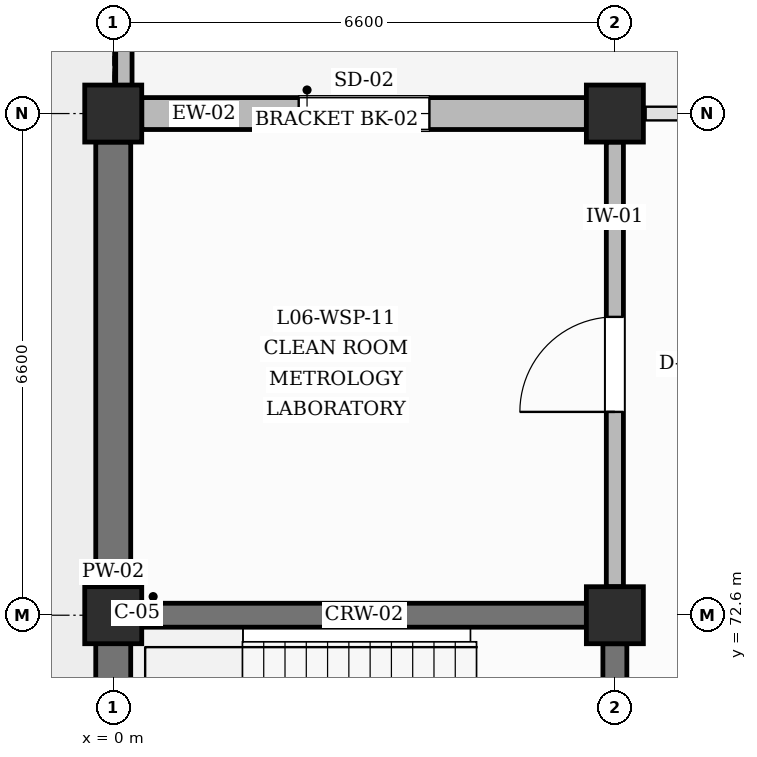
"""IFC4 building model, lengths in metres.
Left out: names, types, materials, properties, quantities, classifications, styles, units other than length and angle.
Written with IfcOpenShell. Run it as: python <this file> out.ifc"""

import sys

from ifc_helpers import new_model, si_unit, direction, frame, frame_2d, origin, origin_2d, place, context, subcontext, project, spatial, rectangle, extrude, element, fill, save


model = new_model("IFC4")
c1 = context("Model", 3, precision=1e-05, world=origin(), true_north=direction((0.0, 1.0)))
c2 = subcontext(c1, "Body", "Model", "MODEL_VIEW")
j1 = project(units=[si_unit("LENGTHUNIT", "METRE"), si_unit("PLANEANGLEUNIT", "RADIAN")], contexts=[c1])
p1 = place(None, origin())
s1 = spatial("IfcSite", under=j1, at=p1, CompositionType="ELEMENT")
p2 = place(p1, origin())
s2 = spatial("IfcBuilding", under=s1, at=p2, CompositionType="ELEMENT")
p3 = place(p2, frame((0.0, 0.0, 27.0)))
s3 = spatial("IfcBuildingStorey", under=s2, at=p3, CompositionType="ELEMENT", Elevation=27.0)
for number, where, z_axis, x_axis in (
    (1, (0.0, 72.6, 0.0), (0.0, 0.0, 1.0), (1.0, 0.0, 0.0)),
    (2, (0.0, 79.2, 0.0), (0.0, 0.0, 1.0), (1.0, 0.0, 0.0)),
    (3, (6.6, 72.6, 0.0), (0.0, 0.0, 1.0), (1.0, 0.0, 0.0)),
    (4, (6.6, 79.2, 0.0), (0.0, 0.0, 1.0), (1.0, 0.0, 0.0)),
):
    element("IfcColumn", number, at=place(p3, frame(where, z_axis=z_axis, x_axis=x_axis)), inside=s3, PredefinedType="COLUMN", context=c2, shape_type="SweptSolid", body=[
        extrude(rectangle(XDim=0.75, YDim=0.75, at=origin_2d()), origin(), (0.0, 0.0, 1.0), 4.2),
    ])
p4 = place(p3, frame((0.0, 66.375, 0.0), z_axis=(0.0, 0.0, 1.0), x_axis=(0.0, 1.0, 0.0)))
e5 = element("IfcWall", 5, at=p4, inside=s3, PredefinedType="SOLIDWALL", context=c2, shape_type="SweptSolid", body=[
    extrude(rectangle(XDim=5.85, YDim=0.46, at=frame_2d((2.925, 0.0))), origin(), (0.0, 0.0, 1.0), 3.27),
])
p5 = place(p3, frame((0.375, 79.2, 0.0), z_axis=(0.0, 0.0, 1.0), x_axis=(1.0, 0.0, 0.0)))
e6 = element("IfcWall", 6, at=p5, inside=s3, PredefinedType="SOLIDWALL", context=c2, shape_type="SweptSolid", body=[
    extrude(rectangle(XDim=5.85, YDim=0.42, at=frame_2d((2.925, 0.0))), origin(), (0.0, 0.0, 1.0), 3.27),
])
p6 = place(p5, frame((2.065, 0.0, 0.95)))
e7 = element("IfcOpeningElement", 7, at=p6, cuts=e6, PredefinedType="OPENING", context=c2, shape_type="SweptSolid", body=[
    extrude(rectangle(XDim=1.72, YDim=1.74, at=frame_2d((0.86, 0.87))), frame((0.0, 0.22, 0.0), z_axis=(0.0, -1.0, 0.0), x_axis=(1.0, 0.0, 0.0)), (0.0, 0.0, 1.0), 0.44),
])
p7 = place(p3, frame((0.0, 72.975, 0.0), z_axis=(0.0, 0.0, 1.0), x_axis=(0.0, 1.0, 0.0)))
e8 = element("IfcWall", 8, at=p7, inside=s3, PredefinedType="SOLIDWALL", context=c2, shape_type="SweptSolid", body=[
    extrude(rectangle(XDim=5.85, YDim=0.46, at=frame_2d((2.925, 0.0))), origin(), (0.0, 0.0, 1.0), 3.27),
])
p8 = place(p3, frame((0.14, 79.5, 0.0), z_axis=(0.0, 0.0, 1.0), x_axis=(0.0, 1.0, 0.0)))
e9 = element("IfcWall", 9, at=p8, inside=s3, PredefinedType="PARAPET", context=c2, shape_type="SweptSolid", body=[
    extrude(rectangle(XDim=6.0, YDim=0.215, at=frame_2d((3.0, 0.0))), origin(), (0.0, 0.0, 1.0), 1.15),
])
p9 = place(p3, frame((0.375, 72.6, 0.0), z_axis=(0.0, 0.0, 1.0), x_axis=(1.0, 0.0, 0.0)))
e10 = element("IfcWall", 10, at=p9, inside=s3, PredefinedType="SHEAR", context=c2, shape_type="SweptSolid", body=[
    extrude(rectangle(XDim=5.85, YDim=0.315, at=frame_2d((2.925, 0.0))), origin(), (0.0, 0.0, 1.0), 3.17),
])
p10 = place(p3, frame((6.6, 66.375, 0.0), z_axis=(0.0, 0.0, 1.0), x_axis=(0.0, 1.0, 0.0)))
e11 = element("IfcWall", 11, at=p10, inside=s3, PredefinedType="SHEAR", context=c2, shape_type="SweptSolid", body=[
    extrude(rectangle(XDim=5.85, YDim=0.315, at=frame_2d((2.925, 0.0))), origin(), (0.0, 0.0, 1.0), 3.17),
])
p11 = place(p10, frame((2.35, 0.0, 0.0)))
e12 = element("IfcOpeningElement", 12, at=p11, cuts=e11, PredefinedType="OPENING", context=c2, shape_type="SweptSolid", body=[
    extrude(rectangle(XDim=1.15, YDim=2.2, at=frame_2d((0.575, 1.1))), frame((0.0, 0.167, 0.0), z_axis=(0.0, -1.0, 0.0), x_axis=(1.0, 0.0, 0.0)), (0.0, 0.0, 1.0), 0.335),
])
p12 = place(p3, frame((6.6, 72.975, 0.0), z_axis=(0.0, 0.0, 1.0), x_axis=(0.0, 1.0, 0.0)))
e13 = element("IfcWall", 13, at=p12, inside=s3, PredefinedType="PARTITIONING", context=c2, shape_type="SweptSolid", body=[
    extrude(rectangle(XDim=5.85, YDim=0.225, at=frame_2d((2.925, 0.0))), origin(), (0.0, 0.0, 1.0), 3.17),
])
p13 = place(p12, frame((2.3, 0.0, 0.0)))
e14 = element("IfcOpeningElement", 14, at=p13, cuts=e13, PredefinedType="OPENING", context=c2, shape_type="SweptSolid", body=[
    extrude(rectangle(XDim=1.25, YDim=2.25, at=frame_2d((0.625, 1.125))), frame((0.0, 0.123, 0.0), z_axis=(0.0, -1.0, 0.0), x_axis=(1.0, 0.0, 0.0)), (0.0, 0.0, 1.0), 0.245),
])
p14 = place(p6, origin())
e15 = element("IfcWindow", 15, at=p14, inside=s3, PartitioningType="DOUBLE_PANEL_VERTICAL", PredefinedType="WINDOW", context=c2, shape_type="SweptSolid", body=[
    extrude(rectangle(XDim=1.72, YDim=1.74, at=frame_2d((0.86, 0.87))), frame((0.0, 0.03, 0.0), z_axis=(0.0, -1.0, 0.0), x_axis=(1.0, 0.0, 0.0)), (0.0, 0.0, 1.0), 0.06),
])
fill(e7, e15)
p15 = place(p13, origin())
e16 = element("IfcDoor", 16, at=p15, inside=s3, OperationType="SINGLE_SWING_LEFT", PredefinedType="DOOR", context=c2, shape_type="SweptSolid", body=[
    extrude(rectangle(XDim=1.25, YDim=2.25, at=frame_2d((0.625, 1.125))), frame((0.0, 0.025, 0.0), z_axis=(0.0, -1.0, 0.0), x_axis=(1.0, 0.0, 0.0)), (0.0, 0.0, 1.0), 0.05),
])
fill(e14, e16)
save(model, sys.argv[1])
